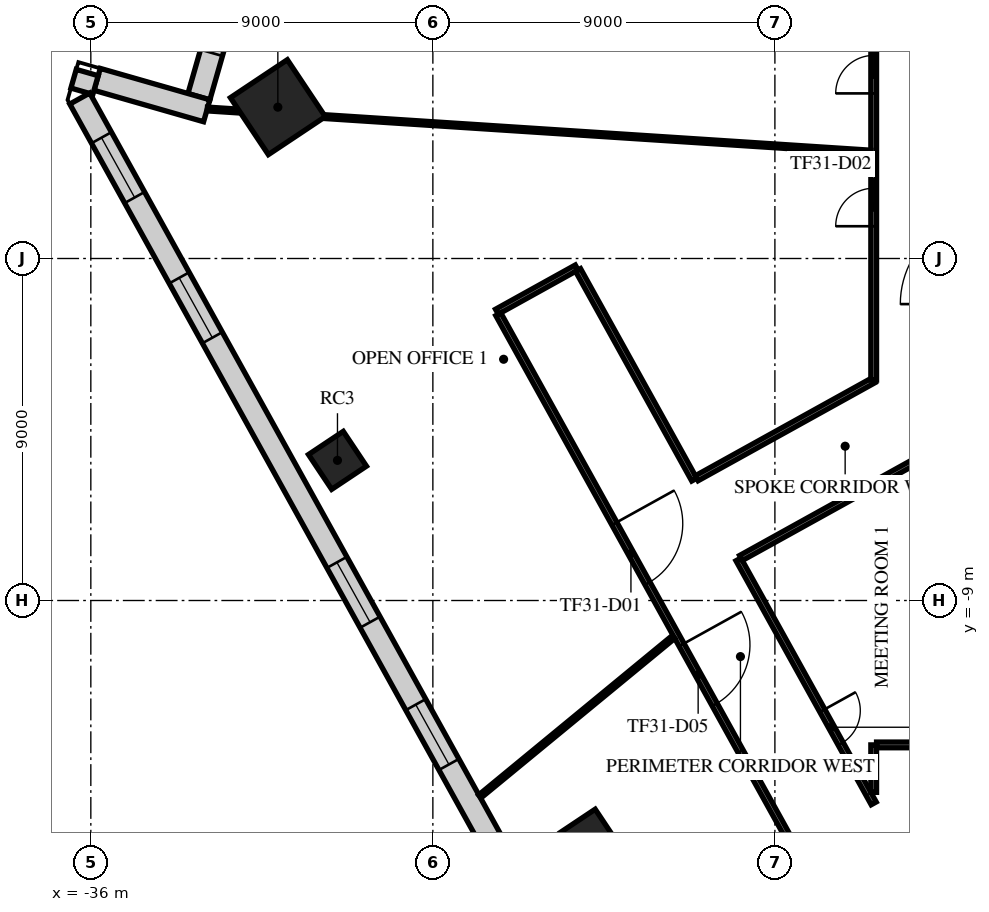
"""IFC4 building model, lengths in metres.
Left out: names, types, materials, properties, quantities, classifications, styles, units other than length and angle.
Written with IfcOpenShell. Run it as: python <this file> out.ifc"""

import sys

from ifc_helpers import new_model, si_unit, direction, frame, frame_2d, origin, origin_2d, place, context, subcontext, project, spatial, rectangle, extrude, element, fill, save


model = new_model("IFC4")
c1 = context("Model", 3, precision=1e-05, world=origin(), true_north=direction((0.0, 1.0)))
c2 = subcontext(c1, "Body", "Model", "MODEL_VIEW")
j1 = project(units=[si_unit("LENGTHUNIT", "METRE"), si_unit("PLANEANGLEUNIT", "RADIAN")], contexts=[c1])
p1 = place(None, origin())
s1 = spatial("IfcSite", under=j1, at=p1, CompositionType="ELEMENT")
p2 = place(p1, origin())
s2 = spatial("IfcBuilding", under=s1, at=p2, CompositionType="ELEMENT")
p3 = place(p2, frame((0.0, 0.0, 139.7)))
s3 = spatial("IfcBuildingStorey", under=s2, at=p3, CompositionType="ELEMENT", Elevation=139.7)
p4 = place(p3, frame((-31.079, 3.982, 0.0), z_axis=(0.0, 0.0, 1.0), x_axis=(0.832028680356, 0.55473261583, 0.0)))
e1 = element("IfcColumn", 1, at=p4, inside=s3, PredefinedType="COLUMN", context=c2, shape_type="SweptSolid", body=[
    extrude(rectangle(XDim=1.8, YDim=1.8, at=origin_2d()), origin(), (0.0, 0.0, 1.0), 4.0),
])
for number, where, z_axis, x_axis in (
    (2, (-29.51, -5.312, 0.0), (0.0, 0.0, 1.0), (0.832, 0.555, 0.0)),
    (3, (-22.881, -15.255, 0.0), (0.0, 0.0, 1.0), (0.832, 0.555, 0.0)),
):
    element("IfcColumn", number, at=place(p3, frame(where, z_axis=z_axis, x_axis=x_axis)), inside=s3, PredefinedType="COLUMN", context=c2, shape_type="SweptSolid", body=[
        extrude(rectangle(XDim=1.1, YDim=1.1, at=origin_2d()), origin(), (0.0, 0.0, 1.0), 4.0),
    ])
p5 = place(p3, frame((-31.778, 9.065, 0.0), z_axis=(0.0, 0.0, 1.0), x_axis=(-0.275675415896, -0.961250781571, 0.0)))
e4 = element("IfcWall", 4, at=p5, inside=s3, PredefinedType="STANDARD", context=c2, shape_type="SweptSolid", body=[
    extrude(rectangle(XDim=5.0, YDim=0.6, at=frame_2d((2.5, 0.0))), origin(), (0.0, 0.0, 1.0), 3.6),
])
p6 = place(p5, frame((1.2, 0.0, 0.9)))
e5 = element("IfcOpeningElement", 5, at=p6, cuts=e4, PredefinedType="OPENING", context=c2, shape_type="SweptSolid", body=[
    extrude(rectangle(XDim=2.6, YDim=2.1, at=frame_2d((1.3, 1.05))), frame((0.0, 0.31, 0.0), z_axis=(0.0, -1.0, 0.0), x_axis=(1.0, 0.0, 0.0)), (0.0, 0.0, 1.0), 0.62),
])
p7 = place(p3, frame((-32.95, 3.887, 0.0), z_axis=(0.0, 0.0, 1.0), x_axis=(-0.96126248289, 0.275634611374, 0.0)))
e6 = element("IfcWall", 6, at=p7, inside=s3, PredefinedType="STANDARD", context=c2, shape_type="SweptSolid", body=[
    extrude(rectangle(XDim=3.0, YDim=0.6, at=frame_2d((1.5, 0.0))), origin(), (0.0, 0.0, 1.0), 3.6),
])
p8 = place(p3, frame((-36.095, 4.893, 0.0), z_axis=(0.0, 0.0, 1.0), x_axis=(-0.275982153595, -0.961162759837, 0.0)))
e7 = element("IfcWall", 7, at=p8, inside=s3, PredefinedType="STANDARD", context=c2, shape_type="SweptSolid", body=[
    extrude(rectangle(XDim=0.511, YDim=0.6, at=frame_2d((0.256, 0.0))), origin(), (0.0, 0.0, 1.0), 3.6),
])
p9 = place(p3, frame((-36.291, 4.209, 0.0), z_axis=(0.0, 0.0, 1.0), x_axis=(0.484810659622, -0.874619131003, 0.0)))
e8 = element("IfcWall", 8, at=p9, inside=s3, PredefinedType="STANDARD", context=c2, shape_type="SweptSolid", body=[
    extrude(rectangle(XDim=42.552, YDim=0.6, at=frame_2d((21.276, 0.0))), origin(), (0.0, 0.0, 1.0), 3.6),
])
p10 = place(p9, frame((1.178, 0.0, 0.9)))
e9 = element("IfcOpeningElement", 9, at=p10, cuts=e8, PredefinedType="OPENING", context=c2, shape_type="SweptSolid", body=[
    extrude(rectangle(XDim=1.8, YDim=2.1, at=frame_2d((0.9, 1.05))), frame((0.0, 0.31, 0.0), z_axis=(0.0, -1.0, 0.0), x_axis=(1.0, 0.0, 0.0)), (0.0, 0.0, 1.0), 0.62),
])
p11 = place(p9, frame((5.396, 0.0, 0.9)))
e10 = element("IfcOpeningElement", 10, at=p11, cuts=e8, PredefinedType="OPENING", context=c2, shape_type="SweptSolid", body=[
    extrude(rectangle(XDim=1.8, YDim=2.1, at=frame_2d((0.9, 1.05))), frame((0.0, 0.31, 0.0), z_axis=(0.0, -1.0, 0.0), x_axis=(1.0, 0.0, 0.0)), (0.0, 0.0, 1.0), 0.62),
])
p12 = place(p9, frame((13.956, 0.0, 0.9)))
e11 = element("IfcOpeningElement", 11, at=p12, cuts=e8, PredefinedType="OPENING", context=c2, shape_type="SweptSolid", body=[
    extrude(rectangle(XDim=1.8, YDim=2.1, at=frame_2d((0.9, 1.05))), frame((0.0, 0.31, 0.0), z_axis=(0.0, -1.0, 0.0), x_axis=(1.0, 0.0, 0.0)), (0.0, 0.0, 1.0), 0.62),
])
p13 = place(p9, frame((18.236, 0.0, 0.9)))
e12 = element("IfcOpeningElement", 12, at=p13, cuts=e8, PredefinedType="OPENING", context=c2, shape_type="SweptSolid", body=[
    extrude(rectangle(XDim=1.8, YDim=2.1, at=frame_2d((0.9, 1.05))), frame((0.0, 0.31, 0.0), z_axis=(0.0, -1.0, 0.0), x_axis=(1.0, 0.0, 0.0)), (0.0, 0.0, 1.0), 0.62),
])
p14 = place(p9, frame((22.516, 0.0, 0.9)))
e13 = element("IfcOpeningElement", 13, at=p14, cuts=e8, PredefinedType="OPENING", context=c2, shape_type="SweptSolid", body=[
    extrude(rectangle(XDim=1.8, YDim=2.1, at=frame_2d((0.9, 1.05))), frame((0.0, 0.31, 0.0), z_axis=(0.0, -1.0, 0.0), x_axis=(1.0, 0.0, 0.0)), (0.0, 0.0, 1.0), 0.62),
])
p15 = place(p9, frame((26.796, 0.0, 0.9)))
e14 = element("IfcOpeningElement", 14, at=p15, cuts=e8, PredefinedType="OPENING", context=c2, shape_type="SweptSolid", body=[
    extrude(rectangle(XDim=1.8, YDim=2.1, at=frame_2d((0.9, 1.05))), frame((0.0, 0.31, 0.0), z_axis=(0.0, -1.0, 0.0), x_axis=(1.0, 0.0, 0.0)), (0.0, 0.0, 1.0), 0.62),
])
p16 = place(p9, frame((31.076, 0.0, 0.9)))
e15 = element("IfcOpeningElement", 15, at=p16, cuts=e8, PredefinedType="OPENING", context=c2, shape_type="SweptSolid", body=[
    extrude(rectangle(XDim=1.8, YDim=2.1, at=frame_2d((0.9, 1.05))), frame((0.0, 0.31, 0.0), z_axis=(0.0, -1.0, 0.0), x_axis=(1.0, 0.0, 0.0)), (0.0, 0.0, 1.0), 0.62),
])
p17 = place(p9, frame((35.356, 0.0, 0.9)))
e16 = element("IfcOpeningElement", 16, at=p17, cuts=e8, PredefinedType="OPENING", context=c2, shape_type="SweptSolid", body=[
    extrude(rectangle(XDim=1.8, YDim=2.1, at=frame_2d((0.9, 1.05))), frame((0.0, 0.31, 0.0), z_axis=(0.0, -1.0, 0.0), x_axis=(1.0, 0.0, 0.0)), (0.0, 0.0, 1.0), 0.62),
])
p18 = place(p9, frame((39.573, 0.0, 0.9)))
e17 = element("IfcOpeningElement", 17, at=p18, cuts=e8, PredefinedType="OPENING", context=c2, shape_type="SweptSolid", body=[
    extrude(rectangle(XDim=1.8, YDim=2.1, at=frame_2d((0.9, 1.05))), frame((0.0, 0.31, 0.0), z_axis=(0.0, -1.0, 0.0), x_axis=(1.0, 0.0, 0.0)), (0.0, 0.0, 1.0), 0.62),
])
p19 = place(p3, frame((-25.315, -1.401, 0.0), z_axis=(0.0, 0.0, 1.0), x_axis=(0.874550463112, 0.484934518745, 0.0)))
e18 = element("IfcWall", 18, at=p19, inside=s3, PredefinedType="PARTITIONING", context=c2, shape_type="SweptSolid", body=[
    extrude(rectangle(XDim=2.4, YDim=0.15, at=frame_2d((1.2, 0.0))), origin(), (0.0, 0.0, 1.0), 3.15),
])
p20 = place(p3, frame((-25.279, -1.467, 0.0), z_axis=(0.0, 0.0, 1.0), x_axis=(0.484803020703, -0.874623365294, 0.0)))
e19 = element("IfcWall", 19, at=p20, inside=s3, PredefinedType="PARTITIONING", context=c2, shape_type="SweptSolid", body=[
    extrude(rectangle(XDim=22.02, YDim=0.15, at=frame_2d((11.01, 0.0))), origin(), (0.0, 0.0, 1.0), 3.15),
])
p21 = place(p20, frame((6.3, 0.0, 0.0)))
e20 = element("IfcOpeningElement", 20, at=p21, cuts=e19, PredefinedType="OPENING", context=c2, shape_type="SweptSolid", body=[
    extrude(rectangle(XDim=1.8, YDim=2.1, at=frame_2d((0.9, 1.05))), frame((0.0, 0.085, 0.0), z_axis=(0.0, -1.0, 0.0), x_axis=(1.0, 0.0, 0.0)), (0.0, 0.0, 1.0), 0.17),
])
p22 = place(p20, frame((9.948, 0.0, 0.0)))
e21 = element("IfcOpeningElement", 21, at=p22, cuts=e19, PredefinedType="OPENING", context=c2, shape_type="SweptSolid", body=[
    extrude(rectangle(XDim=1.8, YDim=2.1, at=frame_2d((0.9, 1.05))), frame((0.0, 0.085, 0.0), z_axis=(0.0, -1.0, 0.0), x_axis=(1.0, 0.0, 0.0)), (0.0, 0.0, 1.0), 0.17),
])
p23 = place(p20, frame((20.448, 0.0, 0.0)))
e22 = element("IfcOpeningElement", 22, at=p23, cuts=e19, PredefinedType="OPENING", context=c2, shape_type="SweptSolid", body=[
    extrude(rectangle(XDim=1.0, YDim=2.1, at=frame_2d((0.5, 1.05))), frame((0.0, 0.085, 0.0), z_axis=(0.0, -1.0, 0.0), x_axis=(1.0, 0.0, 0.0)), (0.0, 0.0, 1.0), 0.17),
])
p24 = place(p3, frame((-23.18, -0.302, 0.0), z_axis=(0.0, 0.0, 1.0), x_axis=(0.48477505554, -0.874638865776, 0.0)))
e23 = element("IfcWall", 23, at=p24, inside=s3, PredefinedType="PARTITIONING", context=c2, shape_type="SweptSolid", body=[
    extrude(rectangle(XDim=6.307, YDim=0.15, at=frame_2d((3.154, 0.0))), origin(), (0.0, 0.0, 1.0), 3.15),
])
p25 = place(p3, frame((-20.056, -5.783, 0.0), z_axis=(0.0, 0.0, 1.0), x_axis=(0.874645694613, 0.484762734638, 0.0)))
e24 = element("IfcWall", 24, at=p25, inside=s3, PredefinedType="PARTITIONING", context=c2, shape_type="SweptSolid", body=[
    extrude(rectangle(XDim=5.324, YDim=0.15, at=frame_2d((2.662, 0.0))), origin(), (0.0, 0.0, 1.0), 3.15),
])
p26 = place(p3, frame((-18.959, -7.918, 0.0), z_axis=(0.0, 0.0, 1.0), x_axis=(0.484857684507, -0.874593062958, 0.0)))
e25 = element("IfcWall", 25, at=p26, inside=s3, PredefinedType="PARTITIONING", context=c2, shape_type="SweptSolid", body=[
    extrude(rectangle(XDim=7.341, YDim=0.15, at=frame_2d((3.67, 0.0))), origin(), (0.0, 0.0, 1.0), 3.15),
])
p27 = place(p26, frame((4.55, 0.0, 0.0)))
e26 = element("IfcOpeningElement", 26, at=p27, cuts=e25, PredefinedType="OPENING", context=c2, shape_type="SweptSolid", body=[
    extrude(rectangle(XDim=1.0, YDim=2.1, at=frame_2d((0.5, 1.05))), frame((0.0, 0.085, 0.0), z_axis=(0.0, -1.0, 0.0), x_axis=(1.0, 0.0, 0.0)), (0.0, 0.0, 1.0), 0.17),
])
p28 = place(p3, frame((-18.893, -7.882, 0.0), z_axis=(0.0, 0.0, 1.0), x_axis=(0.874670900287, 0.484717253861, 0.0)))
e27 = element("IfcWall", 27, at=p28, inside=s3, PredefinedType="PARTITIONING", context=c2, shape_type="SweptSolid", body=[
    extrude(rectangle(XDim=6.966, YDim=0.15, at=frame_2d((3.483, 0.0))), origin(), (0.0, 0.0, 1.0), 3.15),
])
p29 = place(p3, frame((-15.4, -14.048, 0.0), z_axis=(0.0, 0.0, 1.0), x_axis=(0.0, 1.0, 0.0)))
e28 = element("IfcWall", 28, at=p29, inside=s3, PredefinedType="PARTITIONING", context=c2, shape_type="SweptSolid", body=[
    extrude(rectangle(XDim=1.248, YDim=0.15, at=frame_2d((0.624, 0.0))), origin(), (0.0, 0.0, 1.0), 3.15),
])
p30 = place(p3, frame((-15.4, -3.201, 0.0), z_axis=(0.0, 0.0, 1.0), x_axis=(0.0, 1.0, 0.0)))
e29 = element("IfcWall", 29, at=p30, inside=s3, PredefinedType="PARTITIONING", context=c2, shape_type="SweptSolid", body=[
    extrude(rectangle(XDim=13.896, YDim=0.15, at=frame_2d((6.948, 0.0))), origin(), (0.0, 0.0, 1.0), 3.15),
])
p31 = place(p30, frame((4.05, 0.0, 0.0)))
e30 = element("IfcOpeningElement", 30, at=p31, cuts=e29, PredefinedType="OPENING", context=c2, shape_type="SweptSolid", body=[
    extrude(rectangle(XDim=1.0, YDim=2.1, at=frame_2d((0.5, 1.05))), frame((0.0, 0.085, 0.0), z_axis=(0.0, -1.0, 0.0), x_axis=(1.0, 0.0, 0.0)), (0.0, 0.0, 1.0), 0.17),
])
p32 = place(p30, frame((7.546, 0.0, 0.0)))
e31 = element("IfcOpeningElement", 31, at=p32, cuts=e29, PredefinedType="OPENING", context=c2, shape_type="SweptSolid", body=[
    extrude(rectangle(XDim=1.0, YDim=2.1, at=frame_2d((0.5, 1.05))), frame((0.0, 0.085, 0.0), z_axis=(0.0, -1.0, 0.0), x_axis=(1.0, 0.0, 0.0)), (0.0, 0.0, 1.0), 0.17),
])
p33 = place(p3, frame((-15.325, -12.8, 0.0), z_axis=(0.0, 0.0, 1.0), x_axis=(1.0, 0.0, 0.0)))
e32 = element("IfcWall", 32, at=p33, inside=s3, PredefinedType="PARTITIONING", context=c2, shape_type="SweptSolid", body=[
    extrude(rectangle(XDim=2.525, YDim=0.15, at=frame_2d((1.262, 0.0))), origin(), (0.0, 0.0, 1.0), 3.03),
])
p34 = place(p3, frame((-32.935, 3.934, 0.0), z_axis=(0.0, 0.0, 1.0), x_axis=(0.997900062075, -0.064772417822, 0.0)))
e33 = element("IfcWall", 33, at=p34, inside=s3, PredefinedType="PARTITIONING", context=c2, shape_type="SweptSolid", body=[
    extrude(rectangle(XDim=0.844, YDim=0.1, at=frame_2d((0.422, 0.0))), origin(), (0.0, 0.0, 1.0), 3.6),
])
p35 = place(p3, frame((-29.831, 3.732, 0.0), z_axis=(0.0, 0.0, 1.0), x_axis=(0.997896608912, -0.0648255962, 0.0)))
e34 = element("IfcWall", 34, at=p35, inside=s3, PredefinedType="PARTITIONING", context=c2, shape_type="SweptSolid", body=[
    extrude(rectangle(XDim=14.383, YDim=0.1, at=frame_2d((7.191, 0.0))), origin(), (0.0, 0.0, 1.0), 3.03),
])
p36 = place(p3, frame((-25.765, -14.157, 0.0), z_axis=(0.0, 0.0, 1.0), x_axis=(0.772001730939, 0.635620427164, 0.0)))
e35 = element("IfcWall", 35, at=p36, inside=s3, PredefinedType="PARTITIONING", context=c2, shape_type="SweptSolid", body=[
    extrude(rectangle(XDim=6.604, YDim=0.1, at=frame_2d((3.302, 0.0))), origin(), (0.0, 0.0, 1.0), 3.15),
])
p37 = place(p6, origin())
e36 = element("IfcWindow", 36, at=p37, inside=s3, PartitioningType="SINGLE_PANEL", PredefinedType="WINDOW", context=c2, shape_type="SweptSolid", body=[
    extrude(rectangle(XDim=2.6, YDim=2.1, at=frame_2d((1.3, 1.05))), frame((0.0, 0.03, 0.0), z_axis=(0.0, -1.0, 0.0), x_axis=(1.0, 0.0, 0.0)), (0.0, 0.0, 1.0), 0.06),
])
fill(e5, e36)
p38 = place(p10, origin())
e37 = element("IfcWindow", 37, at=p38, inside=s3, PartitioningType="SINGLE_PANEL", PredefinedType="WINDOW", context=c2, shape_type="SweptSolid", body=[
    extrude(rectangle(XDim=1.8, YDim=2.1, at=frame_2d((0.9, 1.05))), frame((0.0, 0.03, 0.0), z_axis=(0.0, -1.0, 0.0), x_axis=(1.0, 0.0, 0.0)), (0.0, 0.0, 1.0), 0.06),
])
fill(e9, e37)
p39 = place(p11, origin())
e38 = element("IfcWindow", 38, at=p39, inside=s3, PartitioningType="SINGLE_PANEL", PredefinedType="WINDOW", context=c2, shape_type="SweptSolid", body=[
    extrude(rectangle(XDim=1.8, YDim=2.1, at=frame_2d((0.9, 1.05))), frame((0.0, 0.03, 0.0), z_axis=(0.0, -1.0, 0.0), x_axis=(1.0, 0.0, 0.0)), (0.0, 0.0, 1.0), 0.06),
])
fill(e10, e38)
p40 = place(p12, origin())
e39 = element("IfcWindow", 39, at=p40, inside=s3, PartitioningType="SINGLE_PANEL", PredefinedType="WINDOW", context=c2, shape_type="SweptSolid", body=[
    extrude(rectangle(XDim=1.8, YDim=2.1, at=frame_2d((0.9, 1.05))), frame((0.0, 0.03, 0.0), z_axis=(0.0, -1.0, 0.0), x_axis=(1.0, 0.0, 0.0)), (0.0, 0.0, 1.0), 0.06),
])
fill(e11, e39)
p41 = place(p13, origin())
e40 = element("IfcWindow", 40, at=p41, inside=s3, PartitioningType="SINGLE_PANEL", PredefinedType="WINDOW", context=c2, shape_type="SweptSolid", body=[
    extrude(rectangle(XDim=1.8, YDim=2.1, at=frame_2d((0.9, 1.05))), frame((0.0, 0.03, 0.0), z_axis=(0.0, -1.0, 0.0), x_axis=(1.0, 0.0, 0.0)), (0.0, 0.0, 1.0), 0.06),
])
fill(e12, e40)
p42 = place(p21, frame((1.8, 0.0, 0.0), z_axis=(0.0, 0.0, 1.0), x_axis=(-1.0, 0.0, 0.0)))
e41 = element("IfcDoor", 41, at=p42, inside=s3, OperationType="DOUBLE_DOOR_SINGLE_SWING", PredefinedType="DOOR", context=c2, shape_type="SweptSolid", body=[
    extrude(rectangle(XDim=1.8, YDim=2.1, at=frame_2d((0.9, 1.05))), frame((0.0, 0.025, 0.0), z_axis=(0.0, -1.0, 0.0), x_axis=(1.0, 0.0, 0.0)), (0.0, 0.0, 1.0), 0.05),
])
fill(e20, e41)
p43 = place(p31, origin())
e42 = element("IfcDoor", 42, at=p43, inside=s3, OperationType="SINGLE_SWING_RIGHT", PredefinedType="DOOR", context=c2, shape_type="SweptSolid", body=[
    extrude(rectangle(XDim=1.0, YDim=2.1, at=frame_2d((0.5, 1.05))), frame((0.0, 0.025, 0.0), z_axis=(0.0, -1.0, 0.0), x_axis=(1.0, 0.0, 0.0)), (0.0, 0.0, 1.0), 0.05),
])
fill(e30, e42)
p44 = place(p32, origin())
e43 = element("IfcDoor", 43, at=p44, inside=s3, OperationType="SINGLE_SWING_RIGHT", PredefinedType="DOOR", context=c2, shape_type="SweptSolid", body=[
    extrude(rectangle(XDim=1.0, YDim=2.1, at=frame_2d((0.5, 1.05))), frame((0.0, 0.025, 0.0), z_axis=(0.0, -1.0, 0.0), x_axis=(1.0, 0.0, 0.0)), (0.0, 0.0, 1.0), 0.05),
])
fill(e31, e43)
p45 = place(p22, frame((1.8, 0.0, 0.0), z_axis=(0.0, 0.0, 1.0), x_axis=(-1.0, 0.0, 0.0)))
e44 = element("IfcDoor", 44, at=p45, inside=s3, OperationType="DOUBLE_DOOR_SINGLE_SWING", PredefinedType="DOOR", context=c2, shape_type="SweptSolid", body=[
    extrude(rectangle(XDim=1.8, YDim=2.1, at=frame_2d((0.9, 1.05))), frame((0.0, 0.025, 0.0), z_axis=(0.0, -1.0, 0.0), x_axis=(1.0, 0.0, 0.0)), (0.0, 0.0, 1.0), 0.05),
])
fill(e21, e44)
p46 = place(p27, origin())
e45 = element("IfcDoor", 45, at=p46, inside=s3, OperationType="SINGLE_SWING_LEFT", PredefinedType="DOOR", context=c2, shape_type="SweptSolid", body=[
    extrude(rectangle(XDim=1.0, YDim=2.1, at=frame_2d((0.5, 1.05))), frame((0.0, 0.025, 0.0), z_axis=(0.0, -1.0, 0.0), x_axis=(1.0, 0.0, 0.0)), (0.0, 0.0, 1.0), 0.05),
])
fill(e26, e45)
save(model, sys.argv[1])
